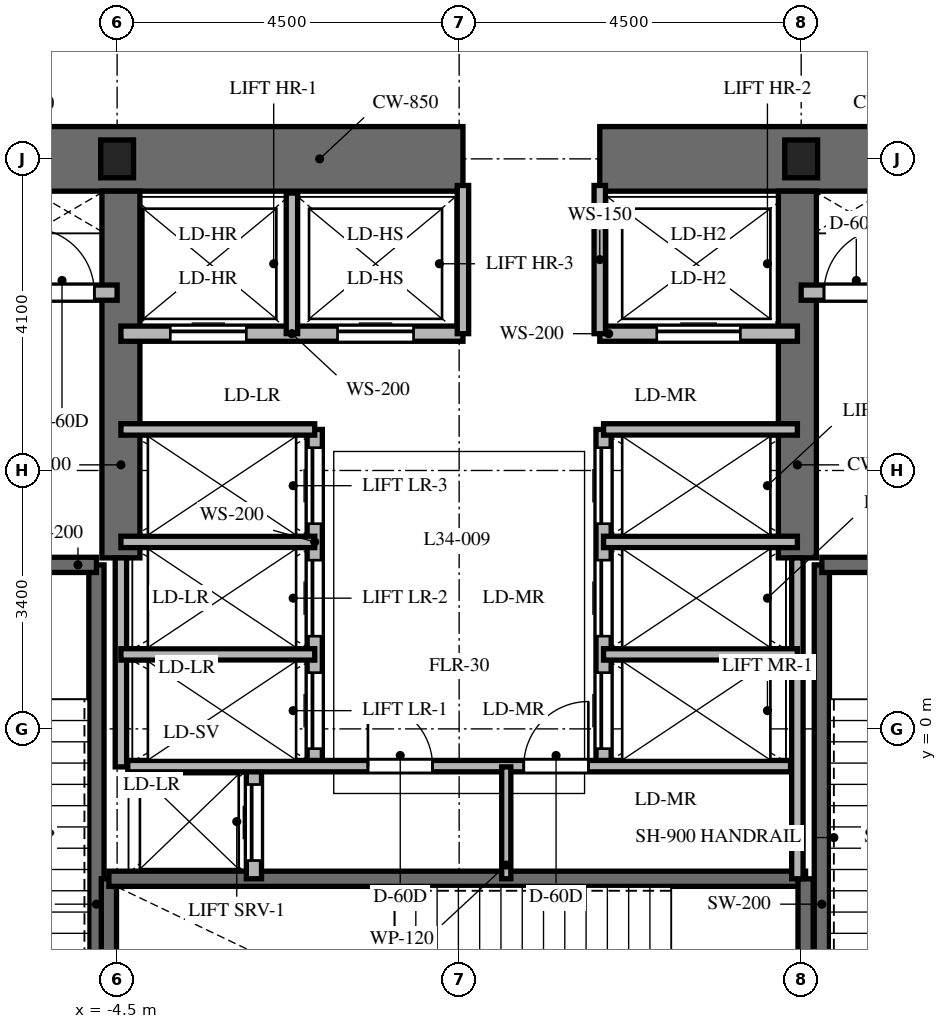
"""IFC4 building model, lengths in metres.
Left out: names, types, materials, properties, quantities, classifications, styles, units other than length and angle.
Written with IfcOpenShell. Run it as: python <this file> out.ifc"""

import sys

from ifc_helpers import new_model, si_unit, direction, frame, frame_2d, origin, origin_2d, place, context, subcontext, project, spatial, rectangle, i_section, extrude, element, fill, save


model = new_model("IFC4")
c1 = context("Model", 3, precision=1e-05, world=origin(), true_north=direction((0.0, 1.0)))
c2 = subcontext(c1, "Body", "Model", "MODEL_VIEW")
j1 = project(units=[si_unit("LENGTHUNIT", "METRE"), si_unit("PLANEANGLEUNIT", "RADIAN")], contexts=[c1])
p1 = place(None, origin())
s1 = spatial("IfcSite", under=j1, at=p1, CompositionType="ELEMENT")
p2 = place(p1, origin())
s2 = spatial("IfcBuilding", under=s1, at=p2, CompositionType="ELEMENT")
p3 = place(p2, frame((0.0, 0.0, 139.5)))
s3 = spatial("IfcBuildingStorey", under=s2, at=p3, CompositionType="ELEMENT", Elevation=139.5)
p4 = place(p3, frame((-9.425, 7.5, 0.0), z_axis=(0.0, 0.0, 1.0), x_axis=(1.0, 0.0, 0.0)))
e1 = element("IfcWall", 1, at=p4, inside=s3, PredefinedType="SHEAR", context=c2, shape_type="SweptSolid", body=[
    extrude(rectangle(XDim=9.475, YDim=0.85, at=frame_2d((4.738, 0.0))), origin(), (0.0, 0.0, 1.0), 4.8),
])
p5 = place(p3, frame((1.85, 7.5, 0.0), z_axis=(0.0, 0.0, 1.0), x_axis=(1.0, 0.0, 0.0)))
e2 = element("IfcWall", 2, at=p5, inside=s3, PredefinedType="SHEAR", context=c2, shape_type="SweptSolid", body=[
    extrude(rectangle(XDim=7.575, YDim=0.85, at=frame_2d((3.788, 0.0))), origin(), (0.0, 0.0, 1.0), 4.8),
])
for number, where, z_axis, x_axis in (
    (3, (-4.45, 2.25, 0.0), (0.0, 0.0, 1.0), (0.0, 1.0, 0.0)),
    (4, (4.45, 2.25, 0.0), (0.0, 0.0, 1.0), (0.0, 1.0, 0.0)),
):
    element("IfcWall", number, at=place(p3, frame(where, z_axis=z_axis, x_axis=x_axis)), inside=s3, PredefinedType="SHEAR", context=c2, shape_type="SweptSolid", body=[
        extrude(rectangle(XDim=4.825, YDim=0.5, at=frame_2d((2.413, 0.0))), origin(), (0.0, 0.0, 1.0), 4.8),
    ])
p6 = place(p3, frame((-4.772, -6.985, 0.0), z_axis=(0.0, 0.0, 1.0), x_axis=(0.0, 1.0, 0.0)))
e5 = element("IfcWall", 5, at=p6, inside=s3, PredefinedType="SHEAR", context=c2, shape_type="SweptSolid", body=[
    extrude(rectangle(XDim=9.143, YDim=0.2, at=frame_2d((4.572, 0.0))), origin(), (0.0, 0.0, 1.0), 4.8),
])
p7 = place(p3, frame((-8.458, 2.158, 0.0), z_axis=(0.0, 0.0, 1.0), x_axis=(1.0, 0.0, 0.0)))
e6 = element("IfcWall", 6, at=p7, inside=s3, PredefinedType="SHEAR", context=c2, shape_type="SweptSolid", body=[
    extrude(rectangle(XDim=3.686, YDim=0.2, at=frame_2d((1.843, 0.0))), origin(), (0.0, 0.0, 1.0), 4.8),
])
p8 = place(p7, frame((1.3, 0.0, 0.0)))
e7 = element("IfcOpeningElement", 7, at=p8, cuts=e6, PredefinedType="OPENING", context=c2, shape_type="SweptSolid", body=[
    extrude(rectangle(XDim=1.0, YDim=2.15, at=frame_2d((0.5, 1.075))), frame((0.0, 0.11, 0.0), z_axis=(0.0, -1.0, 0.0), x_axis=(1.0, 0.0, 0.0)), (0.0, 0.0, 1.0), 0.22),
])
p9 = place(p3, frame((4.772, -6.985, 0.0), z_axis=(0.0, 0.0, 1.0), x_axis=(0.0, 1.0, 0.0)))
e8 = element("IfcWall", 8, at=p9, inside=s3, PredefinedType="SHEAR", context=c2, shape_type="SweptSolid", body=[
    extrude(rectangle(XDim=9.143, YDim=0.2, at=frame_2d((4.572, 0.0))), origin(), (0.0, 0.0, 1.0), 4.8),
])
p10 = place(p3, frame((4.772, 2.158, 0.0), z_axis=(0.0, 0.0, 1.0), x_axis=(1.0, 0.0, 0.0)))
e9 = element("IfcWall", 9, at=p10, inside=s3, PredefinedType="SHEAR", context=c2, shape_type="SweptSolid", body=[
    extrude(rectangle(XDim=3.686, YDim=0.2, at=frame_2d((1.843, 0.0))), origin(), (0.0, 0.0, 1.0), 4.8),
])
p11 = place(p10, frame((1.35, 0.0, 0.0)))
e10 = element("IfcOpeningElement", 10, at=p11, cuts=e9, PredefinedType="OPENING", context=c2, shape_type="SweptSolid", body=[
    extrude(rectangle(XDim=1.0, YDim=2.15, at=frame_2d((0.5, 1.075))), frame((0.0, 0.11, 0.0), z_axis=(0.0, -1.0, 0.0), x_axis=(1.0, 0.0, 0.0)), (0.0, 0.0, 1.0), 0.22),
])
p12 = place(p3, frame((-4.608, -5.658, 0.0), z_axis=(0.0, 0.0, 1.0), x_axis=(0.0, 1.0, 0.0)))
e11 = element("IfcWall", 11, at=p12, inside=s3, PredefinedType="SHEAR", context=c2, shape_type="SweptSolid", body=[
    extrude(rectangle(XDim=3.686, YDim=0.2, at=frame_2d((1.843, 0.0))), origin(), (0.0, 0.0, 1.0), 4.8),
])
p13 = place(p3, frame((-4.608, -1.972, 0.0), z_axis=(0.0, 0.0, 1.0), x_axis=(1.0, 0.0, 0.0)))
e12 = element("IfcWall", 12, at=p13, inside=s3, PredefinedType="SHEAR", context=c2, shape_type="SweptSolid", body=[
    extrude(rectangle(XDim=9.166, YDim=0.2, at=frame_2d((4.583, 0.0))), origin(), (0.0, 0.0, 1.0), 4.8),
])
p14 = place(p3, frame((4.558, -5.658, 0.0), z_axis=(0.0, 0.0, 1.0), x_axis=(0.0, 1.0, 0.0)))
e13 = element("IfcWall", 13, at=p14, inside=s3, PredefinedType="SHEAR", context=c2, shape_type="SweptSolid", body=[
    extrude(rectangle(XDim=3.686, YDim=0.2, at=frame_2d((1.843, 0.0))), origin(), (0.0, 0.0, 1.0), 4.8),
])
for number, where, z_axis, x_axis in (
    (14, (4.5, 7.5, 0.0), (0.0, 0.0, 1.0), (1.0, 0.0, 0.0)),
    (15, (-4.5, 7.5, 0.0), (0.0, 0.0, 1.0), (1.0, 0.0, 0.0)),
):
    element("IfcColumn", number, at=place(p3, frame(where, z_axis=z_axis, x_axis=x_axis)), inside=s3, PredefinedType="COLUMN", context=c2, shape_type="SweptSolid", body=[
        extrude(i_section(OverallWidth=0.432, OverallDepth=0.498, WebThickness=0.056, FlangeThickness=0.089, at=origin_2d()), origin(), (0.0, 0.0, 1.0), 4.8),
    ])
p15 = place(p3, frame((-8.55, 5.74, 0.0), z_axis=(0.0, 0.0, 1.0), x_axis=(1.0, 0.0, 0.0)))
e16 = element("IfcWall", 16, at=p15, inside=s3, PredefinedType="PARTITIONING", context=c2, shape_type="SweptSolid", body=[
    extrude(rectangle(XDim=4.05, YDim=0.2, at=frame_2d((2.025, 0.0))), origin(), (0.0, 0.0, 1.0), 4.5),
])
p16 = place(p15, frame((0.75, 0.0, 0.0)))
e17 = element("IfcOpeningElement", 17, at=p16, cuts=e16, PredefinedType="OPENING", context=c2, shape_type="SweptSolid", body=[
    extrude(rectangle(XDim=1.1, YDim=2.2, at=frame_2d((0.55, 1.1))), frame((0.0, 0.11, 0.0), z_axis=(0.0, -1.0, 0.0), x_axis=(1.0, 0.0, 0.0)), (0.0, 0.0, 1.0), 0.22),
])
p17 = place(p15, frame((2.9, 0.0, 0.0)))
e18 = element("IfcOpeningElement", 18, at=p17, cuts=e16, PredefinedType="OPENING", context=c2, shape_type="SweptSolid", body=[
    extrude(rectangle(XDim=0.85, YDim=2.03, at=frame_2d((0.425, 1.015))), frame((0.0, 0.11, 0.0), z_axis=(0.0, -1.0, 0.0), x_axis=(1.0, 0.0, 0.0)), (0.0, 0.0, 1.0), 0.22),
])
p18 = place(p3, frame((4.5, 5.74, 0.0), z_axis=(0.0, 0.0, 1.0), x_axis=(1.0, 0.0, 0.0)))
e19 = element("IfcWall", 19, at=p18, inside=s3, PredefinedType="PARTITIONING", context=c2, shape_type="SweptSolid", body=[
    extrude(rectangle(XDim=4.05, YDim=0.2, at=frame_2d((2.025, 0.0))), origin(), (0.0, 0.0, 1.0), 4.5),
])
p19 = place(p18, frame((0.3, 0.0, 0.0)))
e20 = element("IfcOpeningElement", 20, at=p19, cuts=e19, PredefinedType="OPENING", context=c2, shape_type="SweptSolid", body=[
    extrude(rectangle(XDim=0.85, YDim=2.03, at=frame_2d((0.425, 1.015))), frame((0.0, 0.11, 0.0), z_axis=(0.0, -1.0, 0.0), x_axis=(1.0, 0.0, 0.0)), (0.0, 0.0, 1.0), 0.22),
])
p20 = place(p18, frame((2.15, 0.0, 0.0)))
e21 = element("IfcOpeningElement", 21, at=p20, cuts=e19, PredefinedType="OPENING", context=c2, shape_type="SweptSolid", body=[
    extrude(rectangle(XDim=1.1, YDim=2.2, at=frame_2d((0.55, 1.1))), frame((0.0, 0.11, 0.0), z_axis=(0.0, -1.0, 0.0), x_axis=(1.0, 0.0, 0.0)), (0.0, 0.0, 1.0), 0.22),
])
p21 = place(p3, frame((-2.7, -1.972, 0.0), z_axis=(0.0, 0.0, 1.0), x_axis=(0.0, 1.0, 0.0)))
e22 = element("IfcWall", 22, at=p21, inside=s3, PredefinedType="PARTITIONING", context=c2, shape_type="SweptSolid", body=[
    extrude(rectangle(XDim=1.472, YDim=0.2, at=frame_2d((0.736, 0.0))), origin(), (0.0, 0.0, 1.0), 4.5),
])
p22 = place(p21, frame((0.24, 0.0, 0.0)))
e23 = element("IfcOpeningElement", 23, at=p22, cuts=e22, PredefinedType="OPENING", context=c2, shape_type="SweptSolid", body=[
    extrude(rectangle(XDim=1.0, YDim=2.2, at=frame_2d((0.5, 1.1))), frame((0.0, 0.11, 0.0), z_axis=(0.0, -1.0, 0.0), x_axis=(1.0, 0.0, 0.0)), (0.0, 0.0, 1.0), 0.22),
])
p23 = place(p3, frame((-4.45, 5.2, 0.0), z_axis=(0.0, 0.0, 1.0), x_axis=(1.0, 0.0, 0.0)))
e24 = element("IfcWall", 24, at=p23, inside=s3, PredefinedType="PARTITIONING", context=c2, shape_type="SweptSolid", body=[
    extrude(rectangle(XDim=4.5, YDim=0.2, at=frame_2d((2.25, 0.0))), origin(), (0.0, 0.0, 1.0), 4.5),
])
p24 = place(p23, frame((0.65, 0.0, 0.0)))
e25 = element("IfcOpeningElement", 25, at=p24, cuts=e24, PredefinedType="OPENING", context=c2, shape_type="SweptSolid", body=[
    extrude(rectangle(XDim=1.0, YDim=2.2, at=frame_2d((0.5, 1.1))), frame((0.0, 0.11, 0.0), z_axis=(0.0, -1.0, 0.0), x_axis=(1.0, 0.0, 0.0)), (0.0, 0.0, 1.0), 0.22),
])
p25 = place(p23, frame((2.85, 0.0, 0.0)))
e26 = element("IfcOpeningElement", 26, at=p25, cuts=e24, PredefinedType="OPENING", context=c2, shape_type="SweptSolid", body=[
    extrude(rectangle(XDim=1.0, YDim=2.2, at=frame_2d((0.5, 1.1))), frame((0.0, 0.11, 0.0), z_axis=(0.0, -1.0, 0.0), x_axis=(1.0, 0.0, 0.0)), (0.0, 0.0, 1.0), 0.22),
])
p26 = place(p3, frame((1.85, 5.2, 0.0), z_axis=(0.0, 0.0, 1.0), x_axis=(1.0, 0.0, 0.0)))
e27 = element("IfcWall", 27, at=p26, inside=s3, PredefinedType="PARTITIONING", context=c2, shape_type="SweptSolid", body=[
    extrude(rectangle(XDim=2.6, YDim=0.2, at=frame_2d((1.3, 0.0))), origin(), (0.0, 0.0, 1.0), 4.5),
])
p27 = place(p26, frame((0.75, 0.0, 0.0)))
e28 = element("IfcOpeningElement", 28, at=p27, cuts=e27, PredefinedType="OPENING", context=c2, shape_type="SweptSolid", body=[
    extrude(rectangle(XDim=1.1, YDim=2.2, at=frame_2d((0.55, 1.1))), frame((0.0, 0.11, 0.0), z_axis=(0.0, -1.0, 0.0), x_axis=(1.0, 0.0, 0.0)), (0.0, 0.0, 1.0), 0.22),
])
p28 = place(p3, frame((-2.2, 5.2, 0.0), z_axis=(0.0, 0.0, 1.0), x_axis=(0.0, 1.0, 0.0)))
e29 = element("IfcWall", 29, at=p28, inside=s3, PredefinedType="PARTITIONING", context=c2, shape_type="SweptSolid", body=[
    extrude(rectangle(XDim=1.85, YDim=0.15, at=frame_2d((0.925, 0.0))), origin(), (0.0, 0.0, 1.0), 4.5),
])
for number, where, z_axis, x_axis in (
    (30, (0.05, 5.2, 0.0), (0.0, 0.0, 1.0), (0.0, 1.0, 0.0)),
    (31, (1.85, 5.2, 0.0), (0.0, 0.0, 1.0), (0.0, 1.0, 0.0)),
):
    element("IfcWall", number, at=place(p3, frame(where, z_axis=z_axis, x_axis=x_axis)), inside=s3, PredefinedType="PARTITIONING", context=c2, shape_type="SweptSolid", body=[
        extrude(rectangle(XDim=1.95, YDim=0.15, at=frame_2d((0.975, 0.0))), origin(), (0.0, 0.0, 1.0), 4.5),
    ])
p29 = place(p3, frame((-4.45, -0.5, 0.0), z_axis=(0.0, 0.0, 1.0), x_axis=(0.0, 1.0, 0.0)))
e32 = element("IfcWall", 32, at=p29, inside=s3, PredefinedType="PARTITIONING", context=c2, shape_type="SweptSolid", body=[
    extrude(rectangle(XDim=2.75, YDim=0.15, at=frame_2d((1.375, 0.0))), origin(), (0.0, 0.0, 1.0), 4.5),
])
p30 = place(p3, frame((4.45, -1.972, 0.0), z_axis=(0.0, 0.0, 1.0), x_axis=(0.0, 1.0, 0.0)))
e33 = element("IfcWall", 33, at=p30, inside=s3, PredefinedType="PARTITIONING", context=c2, shape_type="SweptSolid", body=[
    extrude(rectangle(XDim=4.222, YDim=0.15, at=frame_2d((2.111, 0.0))), origin(), (0.0, 0.0, 1.0), 4.5),
])
p31 = place(p3, frame((-1.9, -0.5, 0.0), z_axis=(0.0, 0.0, 1.0), x_axis=(0.0, 1.0, 0.0)))
e34 = element("IfcWall", 34, at=p31, inside=s3, PredefinedType="PARTITIONING", context=c2, shape_type="SweptSolid", body=[
    extrude(rectangle(XDim=4.44, YDim=0.2, at=frame_2d((2.22, 0.0))), origin(), (0.0, 0.0, 1.0), 4.5),
])
p32 = place(p31, frame((0.24, 0.0, 0.0)))
e35 = element("IfcOpeningElement", 35, at=p32, cuts=e34, PredefinedType="OPENING", context=c2, shape_type="SweptSolid", body=[
    extrude(rectangle(XDim=1.0, YDim=2.2, at=frame_2d((0.5, 1.1))), frame((0.0, 0.11, 0.0), z_axis=(0.0, -1.0, 0.0), x_axis=(1.0, 0.0, 0.0)), (0.0, 0.0, 1.0), 0.22),
])
p33 = place(p31, frame((1.72, 0.0, 0.0)))
e36 = element("IfcOpeningElement", 36, at=p33, cuts=e34, PredefinedType="OPENING", context=c2, shape_type="SweptSolid", body=[
    extrude(rectangle(XDim=1.0, YDim=2.2, at=frame_2d((0.5, 1.1))), frame((0.0, 0.11, 0.0), z_axis=(0.0, -1.0, 0.0), x_axis=(1.0, 0.0, 0.0)), (0.0, 0.0, 1.0), 0.22),
])
p34 = place(p31, frame((3.2, 0.0, 0.0)))
e37 = element("IfcOpeningElement", 37, at=p34, cuts=e34, PredefinedType="OPENING", context=c2, shape_type="SweptSolid", body=[
    extrude(rectangle(XDim=1.0, YDim=2.2, at=frame_2d((0.5, 1.1))), frame((0.0, 0.11, 0.0), z_axis=(0.0, -1.0, 0.0), x_axis=(1.0, 0.0, 0.0)), (0.0, 0.0, 1.0), 0.22),
])
for number, where, z_axis, x_axis in (
    (38, (-4.45, 3.94, 0.0), (0.0, 0.0, 1.0), (1.0, 0.0, 0.0)),
    (39, (-4.45, 0.98, 0.0), (0.0, 0.0, 1.0), (1.0, 0.0, 0.0)),
    (40, (-4.45, 2.46, 0.0), (0.0, 0.0, 1.0), (1.0, 0.0, 0.0)),
):
    element("IfcWall", number, at=place(p3, frame(where, z_axis=z_axis, x_axis=x_axis)), inside=s3, PredefinedType="PARTITIONING", context=c2, shape_type="SweptSolid", body=[
        extrude(rectangle(XDim=2.55, YDim=0.15, at=frame_2d((1.275, 0.0))), origin(), (0.0, 0.0, 1.0), 4.5),
    ])
p35 = place(p3, frame((1.9, -0.5, 0.0), z_axis=(0.0, 0.0, 1.0), x_axis=(0.0, 1.0, 0.0)))
e41 = element("IfcWall", 41, at=p35, inside=s3, PredefinedType="PARTITIONING", context=c2, shape_type="SweptSolid", body=[
    extrude(rectangle(XDim=4.44, YDim=0.2, at=frame_2d((2.22, 0.0))), origin(), (0.0, 0.0, 1.0), 4.5),
])
p36 = place(p35, frame((0.24, 0.0, 0.0)))
e42 = element("IfcOpeningElement", 42, at=p36, cuts=e41, PredefinedType="OPENING", context=c2, shape_type="SweptSolid", body=[
    extrude(rectangle(XDim=1.0, YDim=2.2, at=frame_2d((0.5, 1.1))), frame((0.0, 0.11, 0.0), z_axis=(0.0, -1.0, 0.0), x_axis=(1.0, 0.0, 0.0)), (0.0, 0.0, 1.0), 0.22),
])
p37 = place(p35, frame((1.72, 0.0, 0.0)))
e43 = element("IfcOpeningElement", 43, at=p37, cuts=e41, PredefinedType="OPENING", context=c2, shape_type="SweptSolid", body=[
    extrude(rectangle(XDim=1.0, YDim=2.2, at=frame_2d((0.5, 1.1))), frame((0.0, 0.11, 0.0), z_axis=(0.0, -1.0, 0.0), x_axis=(1.0, 0.0, 0.0)), (0.0, 0.0, 1.0), 0.22),
])
p38 = place(p35, frame((3.2, 0.0, 0.0)))
e44 = element("IfcOpeningElement", 44, at=p38, cuts=e41, PredefinedType="OPENING", context=c2, shape_type="SweptSolid", body=[
    extrude(rectangle(XDim=1.0, YDim=2.2, at=frame_2d((0.5, 1.1))), frame((0.0, 0.11, 0.0), z_axis=(0.0, -1.0, 0.0), x_axis=(1.0, 0.0, 0.0)), (0.0, 0.0, 1.0), 0.22),
])
for number, where, z_axis, x_axis in (
    (45, (1.9, 3.94, 0.0), (0.0, 0.0, 1.0), (1.0, 0.0, 0.0)),
    (46, (1.9, 0.98, 0.0), (0.0, 0.0, 1.0), (1.0, 0.0, 0.0)),
    (47, (1.9, 2.46, 0.0), (0.0, 0.0, 1.0), (1.0, 0.0, 0.0)),
):
    element("IfcWall", number, at=place(p3, frame(where, z_axis=z_axis, x_axis=x_axis)), inside=s3, PredefinedType="PARTITIONING", context=c2, shape_type="SweptSolid", body=[
        extrude(rectangle(XDim=2.55, YDim=0.15, at=frame_2d((1.275, 0.0))), origin(), (0.0, 0.0, 1.0), 4.5),
    ])
p39 = place(p3, frame((-4.36, -0.49, 0.0), z_axis=(0.0, 0.0, 1.0), x_axis=(1.0, 0.0, 0.0)))
e48 = element("IfcWall", 48, at=p39, inside=s3, PredefinedType="PARTITIONING", context=c2, shape_type="SweptSolid", body=[
    extrude(rectangle(XDim=8.72, YDim=0.15, at=frame_2d((4.36, 0.0))), origin(), (0.0, 0.0, 1.0), 4.5),
])
p40 = place(p39, frame((3.16, 0.0, 0.0)))
e49 = element("IfcOpeningElement", 49, at=p40, cuts=e48, PredefinedType="OPENING", context=c2, shape_type="SweptSolid", body=[
    extrude(rectangle(XDim=0.85, YDim=2.03, at=frame_2d((0.425, 1.015))), frame((0.0, 0.085, 0.0), z_axis=(0.0, -1.0, 0.0), x_axis=(1.0, 0.0, 0.0)), (0.0, 0.0, 1.0), 0.17),
])
p41 = place(p39, frame((5.21, 0.0, 0.0)))
e50 = element("IfcOpeningElement", 50, at=p41, cuts=e48, PredefinedType="OPENING", context=c2, shape_type="SweptSolid", body=[
    extrude(rectangle(XDim=0.85, YDim=2.03, at=frame_2d((0.425, 1.015))), frame((0.0, 0.085, 0.0), z_axis=(0.0, -1.0, 0.0), x_axis=(1.0, 0.0, 0.0)), (0.0, 0.0, 1.0), 0.17),
])
p42 = place(p3, frame((0.62, -1.972, 0.0), z_axis=(0.0, 0.0, 1.0), x_axis=(0.0, 1.0, 0.0)))
e51 = element("IfcWall", 51, at=p42, inside=s3, PredefinedType="PARTITIONING", context=c2, shape_type="SweptSolid", body=[
    extrude(rectangle(XDim=1.472, YDim=0.12, at=frame_2d((0.736, 0.0))), origin(), (0.0, 0.0, 1.0), 4.5),
])
p43 = place(p17, origin())
e52 = element("IfcDoor", 52, at=p43, inside=s3, OperationType="SINGLE_SWING_LEFT", PredefinedType="DOOR", context=c2, shape_type="SweptSolid", body=[
    extrude(rectangle(XDim=0.85, YDim=2.03, at=frame_2d((0.425, 1.015))), frame((0.0, 0.025, 0.0), z_axis=(0.0, -1.0, 0.0), x_axis=(1.0, 0.0, 0.0)), (0.0, 0.0, 1.0), 0.05),
])
fill(e18, e52)
p44 = place(p19, origin())
e53 = element("IfcDoor", 53, at=p44, inside=s3, OperationType="SINGLE_SWING_RIGHT", PredefinedType="DOOR", context=c2, shape_type="SweptSolid", body=[
    extrude(rectangle(XDim=0.85, YDim=2.03, at=frame_2d((0.425, 1.015))), frame((0.0, 0.025, 0.0), z_axis=(0.0, -1.0, 0.0), x_axis=(1.0, 0.0, 0.0)), (0.0, 0.0, 1.0), 0.05),
])
fill(e20, e53)
p45 = place(p22, origin())
e54 = element("IfcDoor", 54, at=p45, inside=s3, OperationType="SLIDING_TO_LEFT", PredefinedType="DOOR", context=c2, shape_type="SweptSolid", body=[
    extrude(rectangle(XDim=1.0, YDim=2.2, at=frame_2d((0.5, 1.1))), frame((0.0, 0.025, 0.0), z_axis=(0.0, -1.0, 0.0), x_axis=(1.0, 0.0, 0.0)), (0.0, 0.0, 1.0), 0.05),
])
fill(e23, e54)
p46 = place(p24, origin())
e55 = element("IfcDoor", 55, at=p46, inside=s3, OperationType="SLIDING_TO_LEFT", PredefinedType="DOOR", context=c2, shape_type="SweptSolid", body=[
    extrude(rectangle(XDim=1.0, YDim=2.2, at=frame_2d((0.5, 1.1))), frame((0.0, 0.025, 0.0), z_axis=(0.0, -1.0, 0.0), x_axis=(1.0, 0.0, 0.0)), (0.0, 0.0, 1.0), 0.05),
])
fill(e25, e55)
p47 = place(p25, origin())
e56 = element("IfcDoor", 56, at=p47, inside=s3, OperationType="SLIDING_TO_RIGHT", PredefinedType="DOOR", context=c2, shape_type="SweptSolid", body=[
    extrude(rectangle(XDim=1.0, YDim=2.2, at=frame_2d((0.5, 1.1))), frame((0.0, 0.025, 0.0), z_axis=(0.0, -1.0, 0.0), x_axis=(1.0, 0.0, 0.0)), (0.0, 0.0, 1.0), 0.05),
])
fill(e26, e56)
p48 = place(p27, origin())
e57 = element("IfcDoor", 57, at=p48, inside=s3, OperationType="SLIDING_TO_RIGHT", PredefinedType="DOOR", context=c2, shape_type="SweptSolid", body=[
    extrude(rectangle(XDim=1.1, YDim=2.2, at=frame_2d((0.55, 1.1))), frame((0.0, 0.025, 0.0), z_axis=(0.0, -1.0, 0.0), x_axis=(1.0, 0.0, 0.0)), (0.0, 0.0, 1.0), 0.05),
])
fill(e28, e57)
p49 = place(p32, origin())
e58 = element("IfcDoor", 58, at=p49, inside=s3, OperationType="SLIDING_TO_LEFT", PredefinedType="DOOR", context=c2, shape_type="SweptSolid", body=[
    extrude(rectangle(XDim=1.0, YDim=2.2, at=frame_2d((0.5, 1.1))), frame((0.0, 0.025, 0.0), z_axis=(0.0, -1.0, 0.0), x_axis=(1.0, 0.0, 0.0)), (0.0, 0.0, 1.0), 0.05),
])
fill(e35, e58)
p50 = place(p33, origin())
e59 = element("IfcDoor", 59, at=p50, inside=s3, OperationType="SLIDING_TO_LEFT", PredefinedType="DOOR", context=c2, shape_type="SweptSolid", body=[
    extrude(rectangle(XDim=1.0, YDim=2.2, at=frame_2d((0.5, 1.1))), frame((0.0, 0.025, 0.0), z_axis=(0.0, -1.0, 0.0), x_axis=(1.0, 0.0, 0.0)), (0.0, 0.0, 1.0), 0.05),
])
fill(e36, e59)
p51 = place(p34, origin())
e60 = element("IfcDoor", 60, at=p51, inside=s3, OperationType="SLIDING_TO_LEFT", PredefinedType="DOOR", context=c2, shape_type="SweptSolid", body=[
    extrude(rectangle(XDim=1.0, YDim=2.2, at=frame_2d((0.5, 1.1))), frame((0.0, 0.025, 0.0), z_axis=(0.0, -1.0, 0.0), x_axis=(1.0, 0.0, 0.0)), (0.0, 0.0, 1.0), 0.05),
])
fill(e37, e60)
p52 = place(p36, origin())
e61 = element("IfcDoor", 61, at=p52, inside=s3, OperationType="SLIDING_TO_RIGHT", PredefinedType="DOOR", context=c2, shape_type="SweptSolid", body=[
    extrude(rectangle(XDim=1.0, YDim=2.2, at=frame_2d((0.5, 1.1))), frame((0.0, 0.025, 0.0), z_axis=(0.0, -1.0, 0.0), x_axis=(1.0, 0.0, 0.0)), (0.0, 0.0, 1.0), 0.05),
])
fill(e42, e61)
p53 = place(p37, origin())
e62 = element("IfcDoor", 62, at=p53, inside=s3, OperationType="SLIDING_TO_RIGHT", PredefinedType="DOOR", context=c2, shape_type="SweptSolid", body=[
    extrude(rectangle(XDim=1.0, YDim=2.2, at=frame_2d((0.5, 1.1))), frame((0.0, 0.025, 0.0), z_axis=(0.0, -1.0, 0.0), x_axis=(1.0, 0.0, 0.0)), (0.0, 0.0, 1.0), 0.05),
])
fill(e43, e62)
p54 = place(p38, origin())
e63 = element("IfcDoor", 63, at=p54, inside=s3, OperationType="SLIDING_TO_RIGHT", PredefinedType="DOOR", context=c2, shape_type="SweptSolid", body=[
    extrude(rectangle(XDim=1.0, YDim=2.2, at=frame_2d((0.5, 1.1))), frame((0.0, 0.025, 0.0), z_axis=(0.0, -1.0, 0.0), x_axis=(1.0, 0.0, 0.0)), (0.0, 0.0, 1.0), 0.05),
])
fill(e44, e63)
p55 = place(p40, origin())
e64 = element("IfcDoor", 64, at=p55, inside=s3, OperationType="SINGLE_SWING_LEFT", PredefinedType="DOOR", context=c2, shape_type="SweptSolid", body=[
    extrude(rectangle(XDim=0.85, YDim=2.03, at=frame_2d((0.425, 1.015))), frame((0.0, 0.025, 0.0), z_axis=(0.0, -1.0, 0.0), x_axis=(1.0, 0.0, 0.0)), (0.0, 0.0, 1.0), 0.05),
])
fill(e49, e64)
p56 = place(p41, origin())
e65 = element("IfcDoor", 65, at=p56, inside=s3, OperationType="SINGLE_SWING_RIGHT", PredefinedType="DOOR", context=c2, shape_type="SweptSolid", body=[
    extrude(rectangle(XDim=0.85, YDim=2.03, at=frame_2d((0.425, 1.015))), frame((0.0, 0.025, 0.0), z_axis=(0.0, -1.0, 0.0), x_axis=(1.0, 0.0, 0.0)), (0.0, 0.0, 1.0), 0.05),
])
fill(e50, e65)
save(model, sys.argv[1])
